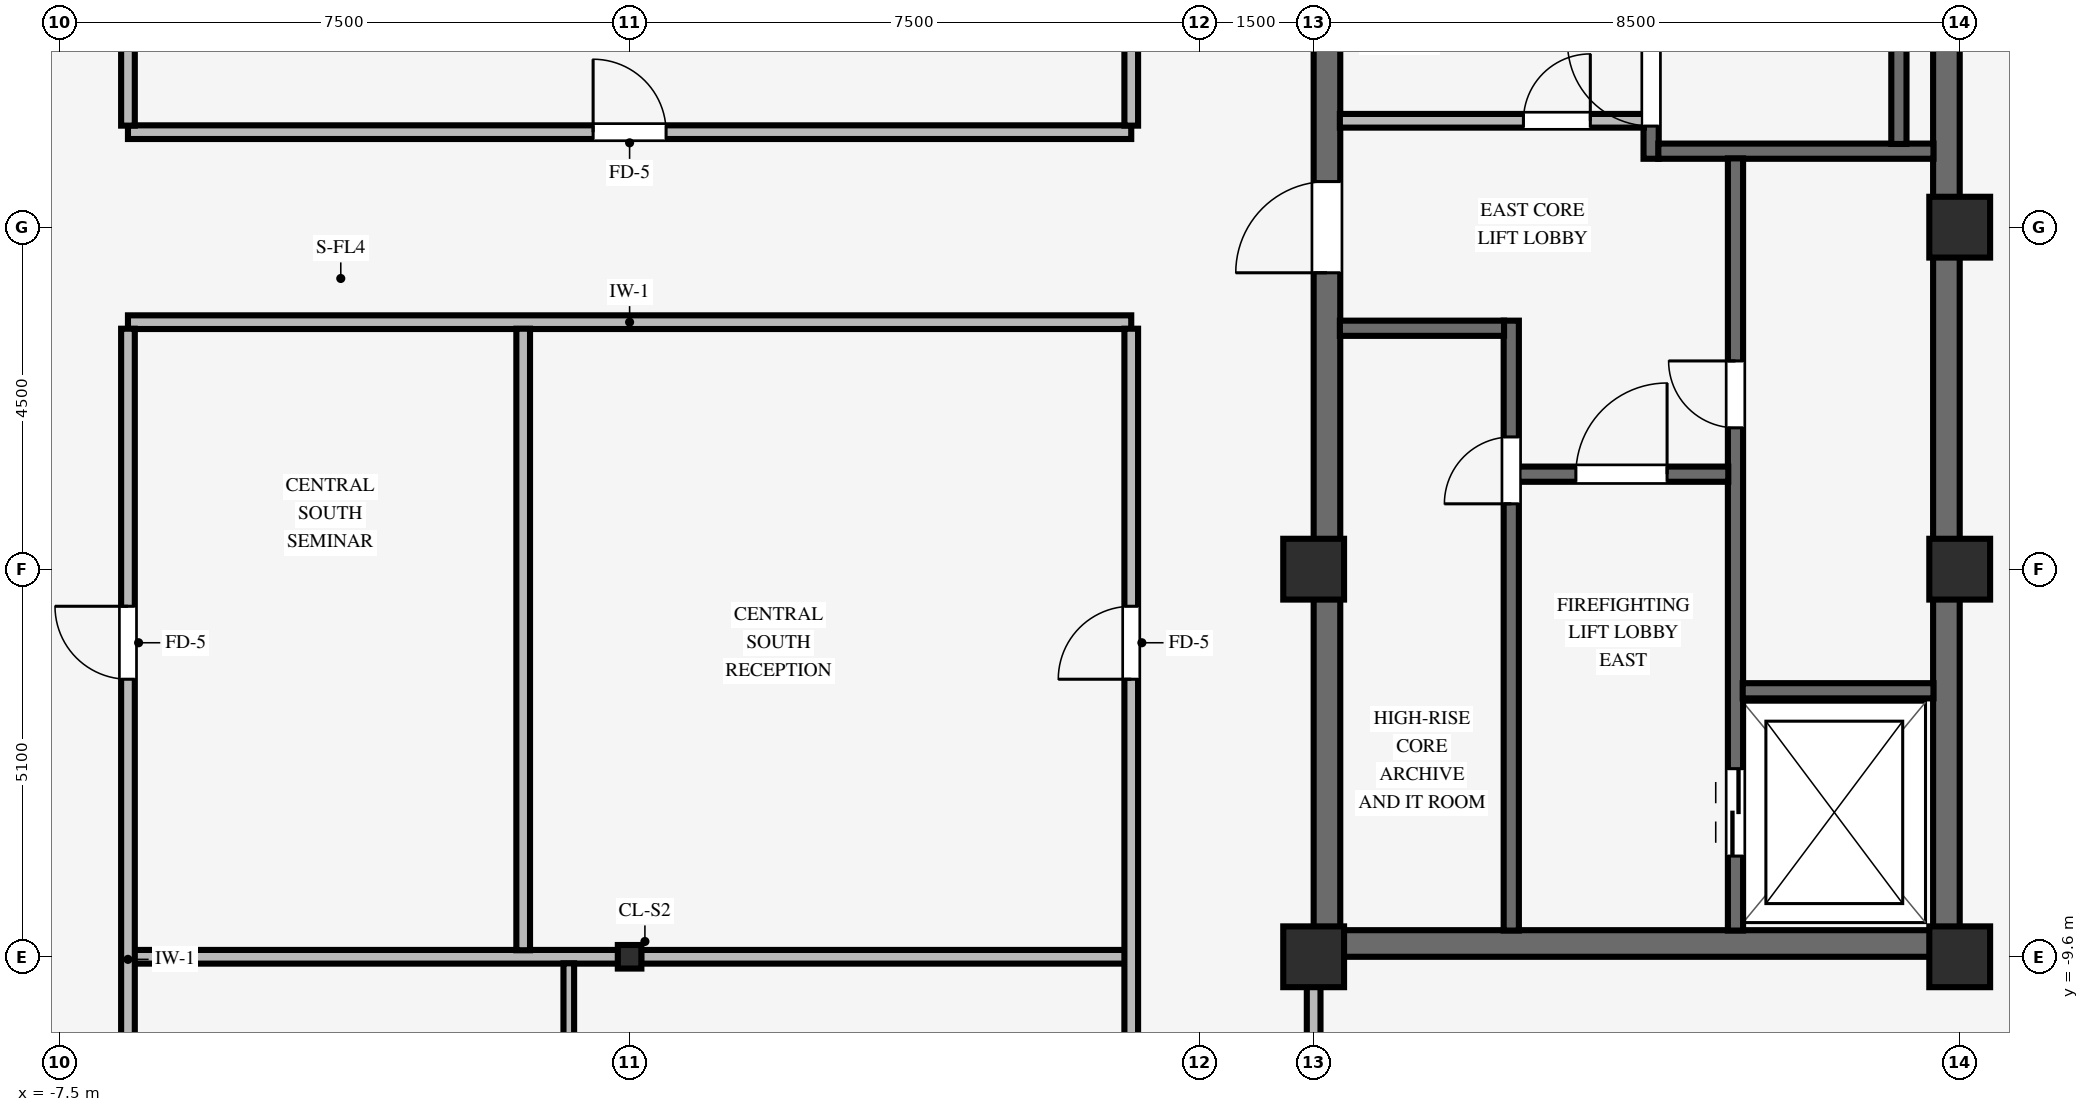
"""IFC4 building model, lengths in metres.
Left out: names, types, materials, properties, quantities, classifications, styles, units other than length and angle.
Written with IfcOpenShell. Run it as: python <this file> out.ifc"""

import sys

from ifc_helpers import new_model, si_unit, direction, frame, frame_2d, origin, origin_2d, place, context, subcontext, project, spatial, rectangle, i_section, extrude, source, transform, mapped, element, fill, save


model = new_model("IFC4")
c1 = context("Model", 3, precision=1e-05, world=origin(), true_north=direction((0.0, 1.0)))
c2 = subcontext(c1, "Body", "Model", "MODEL_VIEW")
j1 = project(units=[si_unit("LENGTHUNIT", "METRE"), si_unit("PLANEANGLEUNIT", "RADIAN")], contexts=[c1])
p1 = place(None, origin())
s1 = spatial("IfcSite", under=j1, at=p1, CompositionType="ELEMENT")
p2 = place(p1, origin())
s2 = spatial("IfcBuilding", under=s1, at=p2, CompositionType="ELEMENT")
p3 = place(p2, frame((0.0, 0.0, 238.35)))
s3 = spatial("IfcBuildingStorey", under=s2, at=p3, CompositionType="ELEMENT", Elevation=238.35)
p4 = place(p3, frame((9.0, -9.425, 0.0), z_axis=(0.0, 0.0, 1.0), x_axis=(1.0, 0.0, 0.0)))
e1 = element("IfcWall", 1, at=p4, inside=s3, PredefinedType="SHEAR", context=c2, shape_type="SweptSolid", body=[
    extrude(rectangle(XDim=8.5, YDim=0.35, at=frame_2d((4.25, 0.0))), origin(), (0.0, 0.0, 1.0), 3.37),
])
p5 = place(p3, frame((9.175, -9.255, 0.0), z_axis=(0.0, 0.0, 1.0), x_axis=(0.0, 1.0, 0.0)))
e2 = element("IfcWall", 2, at=p5, inside=s3, PredefinedType="SHEAR", context=c2, shape_type="SweptSolid", body=[
    extrude(rectangle(XDim=18.51, YDim=0.35, at=frame_2d((9.255, 0.0))), origin(), (0.0, 0.0, 1.0), 3.37),
])
p6 = place(p5, frame((8.655, 0.0, 0.0)))
e3 = element("IfcOpeningElement", 3, at=p6, cuts=e2, PredefinedType="OPENING", context=c2, shape_type="SweptSolid", body=[
    extrude(rectangle(XDim=1.2, YDim=2.15, at=frame_2d((0.6, 1.075))), frame((0.0, 0.185, 0.0), z_axis=(0.0, -1.0, 0.0), x_axis=(1.0, 0.0, 0.0)), (0.0, 0.0, 1.0), 0.37),
])
p7 = place(p3, frame((17.325, -9.255, 0.0), z_axis=(0.0, 0.0, 1.0), x_axis=(0.0, 1.0, 0.0)))
e4 = element("IfcWall", 4, at=p7, inside=s3, PredefinedType="SHEAR", context=c2, shape_type="SweptSolid", body=[
    extrude(rectangle(XDim=18.51, YDim=0.35, at=frame_2d((9.255, 0.0))), origin(), (0.0, 0.0, 1.0), 3.37),
])
for number, where, z_axis, x_axis in (
    (5, (9.0, -9.6, 0.0), (0.0, 0.0, 1.0), (1.0, 0.0, 0.0)),
    (6, (9.0, -4.5, 0.0), (0.0, 0.0, 1.0), (1.0, 0.0, 0.0)),
    (7, (17.5, -9.6, 0.0), (0.0, 0.0, 1.0), (1.0, 0.0, 0.0)),
    (8, (17.5, -4.5, 0.0), (0.0, 0.0, 1.0), (1.0, 0.0, 0.0)),
    (9, (17.5, 0.0, 0.0), (0.0, 0.0, 1.0), (1.0, 0.0, 0.0)),
):
    element("IfcColumn", number, at=place(p3, frame(where, z_axis=z_axis, x_axis=x_axis)), inside=s3, PredefinedType="COLUMN", context=c2, shape_type="SweptSolid", body=[
        extrude(rectangle(XDim=0.8, YDim=0.8, at=origin_2d()), origin(), (0.0, 0.0, 1.0), 3.37),
    ])
p8 = place(p3, frame((0.0, -9.6, 0.0), z_axis=(0.0, 0.0, 1.0), x_axis=(1.0, 0.0, 0.0)))
e10 = element("IfcColumn", 10, at=p8, inside=s3, PredefinedType="COLUMN", context=c2, shape_type="SweptSolid", body=[
    extrude(i_section(OverallWidth=0.31, OverallDepth=0.31, WebThickness=0.015, FlangeThickness=0.015, FilletRadius=0.015, at=origin_2d()), origin(), (0.0, 0.0, 1.0), 3.37),
])
p9 = place(p3, frame((13.44, 0.9, 0.0), z_axis=(0.0, 0.0, 1.0), x_axis=(0.0, 1.0, 0.0)))
e11 = element("IfcWall", 11, at=p9, inside=s3, PredefinedType="SHEAR", context=c2, shape_type="SweptSolid", body=[
    extrude(rectangle(XDim=8.355, YDim=0.2, at=frame_2d((4.177, 0.0))), origin(), (0.0, 0.0, 1.0), 3.37),
])
p10 = place(p9, frame((0.43, 0.0, 0.0)))
e12 = element("IfcOpeningElement", 12, at=p10, cuts=e11, PredefinedType="OPENING", context=c2, shape_type="SweptSolid", body=[
    extrude(rectangle(XDim=1.1, YDim=2.15, at=frame_2d((0.55, 1.075))), frame((0.0, 0.11, 0.0), z_axis=(0.0, -1.0, 0.0), x_axis=(1.0, 0.0, 0.0)), (0.0, 0.0, 1.0), 0.22),
])
p11 = place(p3, frame((13.535, 1.0, 0.0), z_axis=(0.0, 0.0, 1.0), x_axis=(1.0, 0.0, 0.0)))
e13 = element("IfcWall", 13, at=p11, inside=s3, PredefinedType="SHEAR", context=c2, shape_type="SweptSolid", body=[
    extrude(rectangle(XDim=3.62, YDim=0.2, at=frame_2d((1.81, 0.0))), origin(), (0.0, 0.0, 1.0), 3.37),
])
p12 = place(p3, frame((16.7, 1.095, 0.0), z_axis=(0.0, 0.0, 1.0), x_axis=(0.0, 1.0, 0.0)))
e14 = element("IfcWall", 14, at=p12, inside=s3, PredefinedType="SHEAR", context=c2, shape_type="SweptSolid", body=[
    extrude(rectangle(XDim=8.16, YDim=0.2, at=frame_2d((4.08, 0.0))), origin(), (0.0, 0.0, 1.0), 3.37),
])
p13 = place(p3, frame((14.55, -9.255, 0.0), z_axis=(0.0, 0.0, 1.0), x_axis=(0.0, 1.0, 0.0)))
e15 = element("IfcWall", 15, at=p13, inside=s3, PredefinedType="SHEAR", context=c2, shape_type="SweptSolid", body=[
    extrude(rectangle(XDim=10.16, YDim=0.2, at=frame_2d((5.08, 0.0))), origin(), (0.0, 0.0, 1.0), 3.37),
])
p14 = place(p13, frame((6.615, 0.0, 0.0)))
e16 = element("IfcOpeningElement", 16, at=p14, cuts=e15, PredefinedType="OPENING", context=c2, shape_type="SweptSolid", body=[
    extrude(rectangle(XDim=0.88, YDim=2.1, at=frame_2d((0.44, 1.05))), frame((0.0, 0.11, 0.0), z_axis=(0.0, -1.0, 0.0), x_axis=(1.0, 0.0, 0.0)), (0.0, 0.0, 1.0), 0.22),
])
p15 = place(p13, frame((0.98, 0.0, 0.0)))
e17 = element("IfcOpeningElement", 17, at=p15, cuts=e15, PredefinedType="OPENING", context=c2, shape_type="SweptSolid", body=[
    extrude(rectangle(XDim=1.15, YDim=2.15, at=frame_2d((0.575, 1.075))), frame((0.0, 0.11, 0.0), z_axis=(0.0, -1.0, 0.0), x_axis=(1.0, 0.0, 0.0)), (0.0, 0.0, 1.0), 0.22),
])
p16 = place(p3, frame((14.645, -6.1, 0.0), z_axis=(0.0, 0.0, 1.0), x_axis=(1.0, 0.0, 0.0)))
e18 = element("IfcWall", 18, at=p16, inside=s3, PredefinedType="SHEAR", context=c2, shape_type="SweptSolid", body=[
    extrude(rectangle(XDim=2.51, YDim=0.2, at=frame_2d((1.255, 0.0))), origin(), (0.0, 0.0, 1.0), 3.37),
])
p17 = place(p3, frame((11.6, -9.255, 0.0), z_axis=(0.0, 0.0, 1.0), x_axis=(0.0, 1.0, 0.0)))
e19 = element("IfcWall", 19, at=p17, inside=s3, PredefinedType="SHEAR", context=c2, shape_type="SweptSolid", body=[
    extrude(rectangle(XDim=8.025, YDim=0.2, at=frame_2d((4.012, 0.0))), origin(), (0.0, 0.0, 1.0), 3.37),
])
p18 = place(p17, frame((5.615, 0.0, 0.0)))
e20 = element("IfcOpeningElement", 20, at=p18, cuts=e19, PredefinedType="OPENING", context=c2, shape_type="SweptSolid", body=[
    extrude(rectangle(XDim=0.88, YDim=2.1, at=frame_2d((0.44, 1.05))), frame((0.0, 0.11, 0.0), z_axis=(0.0, -1.0, 0.0), x_axis=(1.0, 0.0, 0.0)), (0.0, 0.0, 1.0), 0.22),
])
p19 = place(p3, frame((11.695, -3.25, 0.0), z_axis=(0.0, 0.0, 1.0), x_axis=(1.0, 0.0, 0.0)))
e21 = element("IfcWall", 21, at=p19, inside=s3, PredefinedType="SHEAR", context=c2, shape_type="SweptSolid", body=[
    extrude(rectangle(XDim=2.76, YDim=0.2, at=frame_2d((1.38, 0.0))), origin(), (0.0, 0.0, 1.0), 3.37),
])
p20 = place(p19, frame((0.755, 0.0, 0.0)))
e22 = element("IfcOpeningElement", 22, at=p20, cuts=e21, PredefinedType="OPENING", context=c2, shape_type="SweptSolid", body=[
    extrude(rectangle(XDim=1.2, YDim=2.15, at=frame_2d((0.6, 1.075))), frame((0.0, 0.11, 0.0), z_axis=(0.0, -1.0, 0.0), x_axis=(1.0, 0.0, 0.0)), (0.0, 0.0, 1.0), 0.22),
])
p21 = place(p3, frame((9.345, -1.33, 0.0), z_axis=(0.0, 0.0, 1.0), x_axis=(1.0, 0.0, 0.0)))
e23 = element("IfcWall", 23, at=p21, inside=s3, PredefinedType="SHEAR", context=c2, shape_type="SweptSolid", body=[
    extrude(rectangle(XDim=2.16, YDim=0.2, at=frame_2d((1.08, 0.0))), origin(), (0.0, 0.0, 1.0), 3.37),
])
p22 = place(p3, frame((9.345, 1.4, 0.0), z_axis=(0.0, 0.0, 1.0), x_axis=(1.0, 0.0, 0.0)))
e24 = element("IfcWall", 24, at=p22, inside=s3, PredefinedType="PARTITIONING", context=c2, shape_type="SweptSolid", body=[
    extrude(rectangle(XDim=4.0, YDim=0.18, at=frame_2d((2.0, 0.0))), origin(), (0.0, 0.0, 1.0), 3.36),
])
p23 = place(p22, frame((2.415, 0.0, 0.0)))
e25 = element("IfcOpeningElement", 25, at=p23, cuts=e24, PredefinedType="OPENING", context=c2, shape_type="SweptSolid", body=[
    extrude(rectangle(XDim=0.88, YDim=2.1, at=frame_2d((0.44, 1.05))), frame((0.0, 0.1, 0.0), z_axis=(0.0, -1.0, 0.0), x_axis=(1.0, 0.0, 0.0)), (0.0, 0.0, 1.0), 0.2),
])
p24 = place(p3, frame((-6.539, -9.6, 0.0), z_axis=(0.0, 0.0, 1.0), x_axis=(1.0, 0.0, 0.0)))
e26 = element("IfcWall", 26, at=p24, inside=s3, PredefinedType="PARTITIONING", context=c2, shape_type="SweptSolid", body=[
    extrude(rectangle(XDim=6.388, YDim=0.18, at=frame_2d((3.194, 0.0))), origin(), (0.0, 0.0, 1.0), 2.405),
])
p25 = place(p3, frame((0.151, -9.6, 0.0), z_axis=(0.0, 0.0, 1.0), x_axis=(1.0, 0.0, 0.0)))
e27 = element("IfcWall", 27, at=p25, inside=s3, PredefinedType="PARTITIONING", context=c2, shape_type="SweptSolid", body=[
    extrude(rectangle(XDim=6.383, YDim=0.18, at=frame_2d((3.191, 0.0))), origin(), (0.0, 0.0, 1.0), 2.405),
])
p26 = place(p3, frame((-6.6, -1.25, 0.0), z_axis=(0.0, 0.0, 1.0), x_axis=(1.0, 0.0, 0.0)))
e28 = element("IfcWall", 28, at=p26, inside=s3, PredefinedType="PARTITIONING", context=c2, shape_type="SweptSolid", body=[
    extrude(rectangle(XDim=13.2, YDim=0.18, at=frame_2d((6.6, 0.0))), origin(), (0.0, 0.0, 1.0), 3.36),
])
p27 = place(p3, frame((-6.6, 1.25, 0.0), z_axis=(0.0, 0.0, 1.0), x_axis=(1.0, 0.0, 0.0)))
e29 = element("IfcWall", 29, at=p27, inside=s3, PredefinedType="PARTITIONING", context=c2, shape_type="SweptSolid", body=[
    extrude(rectangle(XDim=13.2, YDim=0.18, at=frame_2d((6.6, 0.0))), origin(), (0.0, 0.0, 1.0), 3.36),
])
p28 = place(p27, frame((6.12, 0.0, 0.0)))
e30 = element("IfcOpeningElement", 30, at=p28, cuts=e29, PredefinedType="OPENING", context=c2, shape_type="SweptSolid", body=[
    extrude(rectangle(XDim=0.96, YDim=2.1, at=frame_2d((0.48, 1.05))), frame((0.0, 0.1, 0.0), z_axis=(0.0, -1.0, 0.0), x_axis=(1.0, 0.0, 0.0)), (0.0, 0.0, 1.0), 0.2),
])
p29 = place(p3, frame((-6.6, -19.1, 0.0), z_axis=(0.0, 0.0, 1.0), x_axis=(0.0, 1.0, 0.0)))
e31 = element("IfcWall", 31, at=p29, inside=s3, PredefinedType="PARTITIONING", context=c2, shape_type="SweptSolid", body=[
    extrude(rectangle(XDim=17.764, YDim=0.18, at=frame_2d((8.882, 0.0))), origin(), (0.0, 0.0, 1.0), 3.36),
])
p30 = place(p29, frame((13.152, 0.0, 0.0)))
e32 = element("IfcOpeningElement", 32, at=p30, cuts=e31, PredefinedType="OPENING", context=c2, shape_type="SweptSolid", body=[
    extrude(rectangle(XDim=0.96, YDim=2.1, at=frame_2d((0.48, 1.05))), frame((0.0, 0.1, 0.0), z_axis=(0.0, -1.0, 0.0), x_axis=(1.0, 0.0, 0.0)), (0.0, 0.0, 1.0), 0.2),
])
p31 = place(p29, frame((4.82, 0.0, 0.0)))
e33 = element("IfcOpeningElement", 33, at=p31, cuts=e31, PredefinedType="OPENING", context=c2, shape_type="SweptSolid", body=[
    extrude(rectangle(XDim=0.96, YDim=2.1, at=frame_2d((0.48, 1.05))), frame((0.0, 0.1, 0.0), z_axis=(0.0, -1.0, 0.0), x_axis=(1.0, 0.0, 0.0)), (0.0, 0.0, 1.0), 0.2),
])
for number, where, z_axis, x_axis in (
    (34, (-6.6, 1.336, 0.0), (0.0, 0.0, 1.0), (0.0, 1.0, 0.0)),
    (35, (-1.4, -9.514, 0.0), (0.0, 0.0, 1.0), (0.0, 1.0, 0.0)),
):
    element("IfcWall", number, at=place(p3, frame(where, z_axis=z_axis, x_axis=x_axis)), inside=s3, PredefinedType="PARTITIONING", context=c2, shape_type="SweptSolid", body=[
        extrude(rectangle(XDim=8.178, YDim=0.18, at=frame_2d((4.089, 0.0))), origin(), (0.0, 0.0, 1.0), 3.36),
    ])
p32 = place(p3, frame((-0.8, -19.1, 0.0), z_axis=(0.0, 0.0, 1.0), x_axis=(0.0, 1.0, 0.0)))
e36 = element("IfcWall", 36, at=p32, inside=s3, PredefinedType="PARTITIONING", context=c2, shape_type="SweptSolid", body=[
    extrude(rectangle(XDim=9.414, YDim=0.14, at=frame_2d((4.707, 0.0))), origin(), (0.0, 0.0, 1.0), 3.36),
])
p33 = place(p3, frame((6.6, -19.1, 0.0), z_axis=(0.0, 0.0, 1.0), x_axis=(0.0, 1.0, 0.0)))
e37 = element("IfcWall", 37, at=p33, inside=s3, PredefinedType="PARTITIONING", context=c2, shape_type="SweptSolid", body=[
    extrude(rectangle(XDim=17.764, YDim=0.18, at=frame_2d((8.882, 0.0))), origin(), (0.0, 0.0, 1.0), 3.36),
])
p34 = place(p33, frame((13.152, 0.0, 0.0)))
e38 = element("IfcOpeningElement", 38, at=p34, cuts=e37, PredefinedType="OPENING", context=c2, shape_type="SweptSolid", body=[
    extrude(rectangle(XDim=0.96, YDim=2.1, at=frame_2d((0.48, 1.05))), frame((0.0, 0.1, 0.0), z_axis=(0.0, -1.0, 0.0), x_axis=(1.0, 0.0, 0.0)), (0.0, 0.0, 1.0), 0.2),
])
p35 = place(p33, frame((6.12, 0.0, 0.0)))
e39 = element("IfcOpeningElement", 39, at=p35, cuts=e37, PredefinedType="OPENING", context=c2, shape_type="SweptSolid", body=[
    extrude(rectangle(XDim=0.96, YDim=2.1, at=frame_2d((0.48, 1.05))), frame((0.0, 0.1, 0.0), z_axis=(0.0, -1.0, 0.0), x_axis=(1.0, 0.0, 0.0)), (0.0, 0.0, 1.0), 0.2),
])
p36 = place(p3, frame((6.6, 1.336, 0.0), z_axis=(0.0, 0.0, 1.0), x_axis=(0.0, 1.0, 0.0)))
e40 = element("IfcWall", 40, at=p36, inside=s3, PredefinedType="PARTITIONING", context=c2, shape_type="SweptSolid", body=[
    extrude(rectangle(XDim=8.178, YDim=0.18, at=frame_2d((4.089, 0.0))), origin(), (0.0, 0.0, 1.0), 3.36),
])
p37 = place(p3, frame((9.0, -15.314, 0.0), z_axis=(0.0, 0.0, 1.0), x_axis=(0.0, 1.0, 0.0)))
e41 = element("IfcWall", 41, at=p37, inside=s3, PredefinedType="PARTITIONING", context=c2, shape_type="SweptSolid", body=[
    extrude(rectangle(XDim=5.318, YDim=0.18, at=frame_2d((2.659, 0.0))), origin(), (0.0, 0.0, 1.0), 2.892),
])
p38 = place(p37, frame((2.179, 0.0, 0.0)))
e42 = element("IfcOpeningElement", 42, at=p38, cuts=e41, PredefinedType="OPENING", context=c2, shape_type="SweptSolid", body=[
    extrude(rectangle(XDim=0.96, YDim=2.1, at=frame_2d((0.48, 1.05))), frame((0.0, 0.1, 0.0), z_axis=(0.0, -1.0, 0.0), x_axis=(1.0, 0.0, 0.0)), (0.0, 0.0, 1.0), 0.2),
])
m1 = source(origin(), c2, "Body", "SweptSolid", [
    extrude(rectangle(XDim=1.1, YDim=2.15, at=frame_2d((0.55, 1.075))), frame((0.0, 0.025, 0.0), z_axis=(0.0, -1.0, 0.0), x_axis=(1.0, 0.0, 0.0)), (0.0, 0.0, 1.0), 0.05),
])
p39 = place(p10, origin())
e43 = element("IfcDoor", 43, at=p39, inside=s3, OperationType="SINGLE_SWING_RIGHT", PredefinedType="DOOR", context=c2, shape_type="MappedRepresentation", body=[
    mapped(m1, transform((0.0, 0.0, 0.0), scale=1.0)),
])
fill(e12, e43)
m2 = source(origin(), c2, "Body", "SweptSolid", [
    extrude(rectangle(XDim=0.88, YDim=2.1, at=frame_2d((0.44, 1.05))), frame((0.0, 0.025, 0.0), z_axis=(0.0, -1.0, 0.0), x_axis=(1.0, 0.0, 0.0)), (0.0, 0.0, 1.0), 0.05),
])
p40 = place(p14, origin())
e44 = element("IfcDoor", 44, at=p40, inside=s3, OperationType="SINGLE_SWING_RIGHT", PredefinedType="DOOR", context=c2, shape_type="MappedRepresentation", body=[
    mapped(m2, transform((0.0, 0.0, 0.0), scale=1.0)),
])
fill(e16, e44)
m3 = source(origin(), c2, "Body", "SweptSolid", [
    extrude(rectangle(XDim=1.2, YDim=2.15, at=frame_2d((0.6, 1.075))), frame((0.0, 0.025, 0.0), z_axis=(0.0, -1.0, 0.0), x_axis=(1.0, 0.0, 0.0)), (0.0, 0.0, 1.0), 0.05),
])
p41 = place(p20, origin())
e45 = element("IfcDoor", 45, at=p41, inside=s3, OperationType="SINGLE_SWING_RIGHT", PredefinedType="DOOR", context=c2, shape_type="MappedRepresentation", body=[
    mapped(m3, transform((0.0, 0.0, 0.0), scale=1.0)),
])
fill(e22, e45)
p42 = place(p18, origin())
e46 = element("IfcDoor", 46, at=p42, inside=s3, OperationType="SINGLE_SWING_LEFT", PredefinedType="DOOR", context=c2, shape_type="MappedRepresentation", body=[
    mapped(m2, transform((0.0, 0.0, 0.0), scale=1.0)),
])
fill(e20, e46)
p43 = place(p6, origin())
e47 = element("IfcDoor", 47, at=p43, inside=s3, OperationType="SINGLE_SWING_LEFT", PredefinedType="DOOR", context=c2, shape_type="MappedRepresentation", body=[
    mapped(m3, transform((0.0, 0.0, 0.0), scale=1.0)),
])
fill(e3, e47)
p44 = place(p23, origin())
e48 = element("IfcDoor", 48, at=p44, inside=s3, OperationType="SINGLE_SWING_RIGHT", PredefinedType="DOOR", context=c2, shape_type="MappedRepresentation", body=[
    mapped(m2, transform((0.0, 0.0, 0.0), scale=1.0)),
])
fill(e25, e48)
m4 = source(origin(), c2, "Body", "SweptSolid", [
    extrude(rectangle(XDim=1.15, YDim=2.15, at=frame_2d((0.575, 1.075))), frame((0.0, 0.025, 0.0), z_axis=(0.0, -1.0, 0.0), x_axis=(1.0, 0.0, 0.0)), (0.0, 0.0, 1.0), 0.05),
])
p45 = place(p15, origin())
e49 = element("IfcDoor", 49, at=p45, inside=s3, OperationType="DOUBLE_DOOR_SLIDING", PredefinedType="DOOR", context=c2, shape_type="MappedRepresentation", body=[
    mapped(m4, transform((0.0, 0.0, 0.0), scale=1.0)),
])
fill(e17, e49)
m5 = source(origin(), c2, "Body", "SweptSolid", [
    extrude(rectangle(XDim=0.96, YDim=2.1, at=frame_2d((0.48, 1.05))), frame((0.0, 0.025, 0.0), z_axis=(0.0, -1.0, 0.0), x_axis=(1.0, 0.0, 0.0)), (0.0, 0.0, 1.0), 0.05),
])
p46 = place(p28, origin())
e50 = element("IfcDoor", 50, at=p46, inside=s3, OperationType="SINGLE_SWING_LEFT", PredefinedType="DOOR", context=c2, shape_type="MappedRepresentation", body=[
    mapped(m5, transform((0.0, 0.0, 0.0), scale=1.0)),
])
fill(e30, e50)
p47 = place(p30, origin())
e51 = element("IfcDoor", 51, at=p47, inside=s3, OperationType="SINGLE_SWING_RIGHT", PredefinedType="DOOR", context=c2, shape_type="MappedRepresentation", body=[
    mapped(m5, transform((0.0, 0.0, 0.0), scale=1.0)),
])
fill(e32, e51)
p48 = place(p34, origin())
e52 = element("IfcDoor", 52, at=p48, inside=s3, OperationType="SINGLE_SWING_LEFT", PredefinedType="DOOR", context=c2, shape_type="MappedRepresentation", body=[
    mapped(m5, transform((0.0, 0.0, 0.0), scale=1.0)),
])
fill(e38, e52)
save(model, sys.argv[1])
